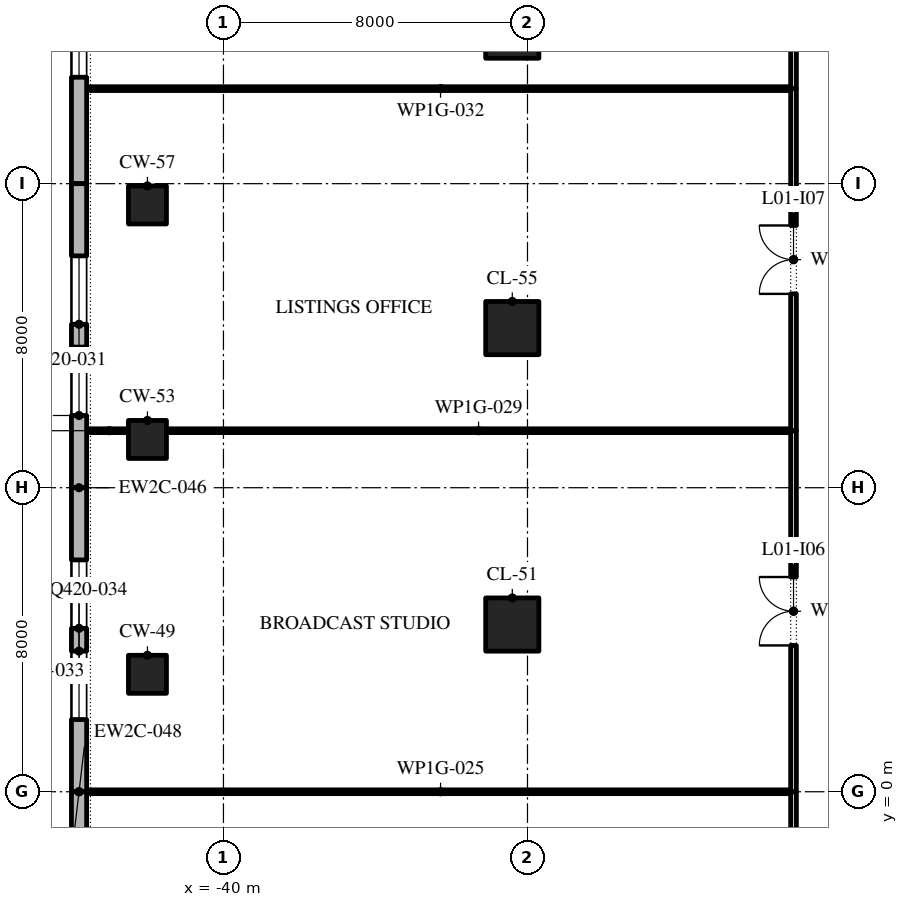
"""IFC4 building model, lengths in metres.
Left out: names, types, materials, properties, quantities, classifications, styles, units other than length and angle.
Written with IfcOpenShell. Run it as: python <this file> out.ifc"""

import sys

from ifc_helpers import new_model, si_unit, direction, frame, frame_2d, origin, origin_2d, place, context, subcontext, project, spatial, polyline, rectangle, outline, extrude, element, fill, save


model = new_model("IFC4")
c1 = context("Model", 3, precision=1e-05, world=origin(), true_north=direction((0.0, 1.0)))
c2 = subcontext(c1, "Body", "Model", "MODEL_VIEW")
j1 = project(units=[si_unit("LENGTHUNIT", "METRE"), si_unit("PLANEANGLEUNIT", "RADIAN")], contexts=[c1])
p1 = place(None, origin())
s1 = spatial("IfcSite", under=j1, at=p1, CompositionType="ELEMENT")
p2 = place(p1, origin())
s2 = spatial("IfcBuilding", under=s1, at=p2, CompositionType="ELEMENT")
p3 = place(p2, frame((0.0, 0.0, 8.0)))
s3 = spatial("IfcBuildingStorey", under=s2, at=p3, CompositionType="ELEMENT", Elevation=8.0)
p4 = place(p3, frame((-42.0, 3.09, 0.0), z_axis=(0.0, 0.0, 1.0), x_axis=(1.0, 0.0, 0.0)))
e1 = element("IfcColumn", 1, at=p4, inside=s3, PredefinedType="COLUMN", context=c2, shape_type="SweptSolid", body=[
    extrude(rectangle(XDim=1.0, YDim=1.0, at=origin_2d()), origin(), (0.0, 0.0, 1.0), 6.0),
])
p5 = place(p3, frame((-32.4, 4.4, 0.0), z_axis=(0.0, 0.0, 1.0), x_axis=(1.0, 0.0, 0.0)))
e2 = element("IfcColumn", 2, at=p5, inside=s3, PredefinedType="COLUMN", context=c2, shape_type="SweptSolid", body=[
    extrude(rectangle(XDim=1.4, YDim=1.4, at=origin_2d()), origin(), (0.0, 0.0, 1.0), 6.0),
])
p6 = place(p3, frame((-42.0, 9.27, 0.0), z_axis=(0.0, 0.0, 1.0), x_axis=(1.0, 0.0, 0.0)))
e3 = element("IfcColumn", 3, at=p6, inside=s3, PredefinedType="COLUMN", context=c2, shape_type="SweptSolid", body=[
    extrude(rectangle(XDim=1.0, YDim=1.0, at=origin_2d()), origin(), (0.0, 0.0, 1.0), 6.0),
])
p7 = place(p3, frame((-32.4, 12.2, 0.0), z_axis=(0.0, 0.0, 1.0), x_axis=(1.0, 0.0, 0.0)))
e4 = element("IfcColumn", 4, at=p7, inside=s3, PredefinedType="COLUMN", context=c2, shape_type="SweptSolid", body=[
    extrude(rectangle(XDim=1.4, YDim=1.4, at=origin_2d()), origin(), (0.0, 0.0, 1.0), 6.0),
])
p8 = place(p3, frame((-42.0, 15.44, 0.0), z_axis=(0.0, 0.0, 1.0), x_axis=(1.0, 0.0, 0.0)))
e5 = element("IfcColumn", 5, at=p8, inside=s3, PredefinedType="COLUMN", context=c2, shape_type="SweptSolid", body=[
    extrude(rectangle(XDim=1.0, YDim=1.0, at=origin_2d()), origin(), (0.0, 0.0, 1.0), 6.0),
])
p9 = place(p3, frame((-32.4, 20.0, 0.0), z_axis=(0.0, 0.0, 1.0), x_axis=(1.0, 0.0, 0.0)))
e6 = element("IfcColumn", 6, at=p9, inside=s3, PredefinedType="COLUMN", context=c2, shape_type="SweptSolid", body=[
    extrude(rectangle(XDim=1.4, YDim=1.4, at=origin_2d()), origin(), (0.0, 0.0, 1.0), 6.0),
])
p10 = place(p3, frame((-43.8, 24.0, 0.0), z_axis=(0.0, 0.0, 1.0), x_axis=(0.0, -1.0, 0.0)))
e7 = element("IfcWall", 7, at=p10, inside=s3, PredefinedType="STANDARD", context=c2, shape_type="SweptSolid", body=[
    extrude(rectangle(XDim=8.0, YDim=0.4, at=frame_2d((4.0, 0.0))), origin(), (0.0, 0.0, 1.0), 5.7),
])
p11 = place(p10, frame((2.8, 0.0, 0.9)))
e8 = element("IfcOpeningElement", 8, at=p11, cuts=e7, PredefinedType="OPENING", context=c2, shape_type="SweptSolid", body=[
    extrude(outline(polyline([(0.0, 0.0), (2.4, 0.0), (2.4, 2.122), (2.379, 2.435), (2.318, 2.743), (2.217, 3.04), (2.078, 3.322), (1.904, 3.583), (1.697, 3.819), (1.461, 4.026), (1.2, 4.2), (0.939, 4.026), (0.703, 3.819), (0.496, 3.583), (0.322, 3.322), (0.183, 3.04), (0.082, 2.743), (0.021, 2.435), (0.0, 2.122), (0.0, 0.0)])), frame((0.0, 0.21, 0.0), z_axis=(0.0, -1.0, 0.0), x_axis=(1.0, 0.0, 0.0)), (0.0, 0.0, 1.0), 0.42),
])
p12 = place(p3, frame((-43.8, 16.0, 0.0), z_axis=(0.0, 0.0, 1.0), x_axis=(0.0, -1.0, 0.0)))
e9 = element("IfcWall", 9, at=p12, inside=s3, PredefinedType="STANDARD", context=c2, shape_type="SweptSolid", body=[
    extrude(rectangle(XDim=8.0, YDim=0.4, at=frame_2d((4.0, 0.0))), origin(), (0.0, 0.0, 1.0), 5.7),
])
p13 = place(p12, frame((1.9, 0.0, 0.9)))
e10 = element("IfcOpeningElement", 10, at=p13, cuts=e9, PredefinedType="OPENING", context=c2, shape_type="SweptSolid", body=[
    extrude(outline(polyline([(0.0, 0.0), (1.8, 0.0), (1.8, 2.641), (1.785, 2.876), (1.739, 3.107), (1.663, 3.33), (1.559, 3.541), (1.428, 3.737), (1.273, 3.914), (1.096, 4.069), (0.9, 4.2), (0.704, 4.069), (0.527, 3.914), (0.372, 3.737), (0.241, 3.541), (0.137, 3.33), (0.061, 3.107), (0.015, 2.876), (0.0, 2.641), (0.0, 0.0)])), frame((0.0, 0.21, 0.0), z_axis=(0.0, -1.0, 0.0), x_axis=(1.0, 0.0, 0.0)), (0.0, 0.0, 1.0), 0.42),
])
p14 = place(p12, frame((4.3, 0.0, 0.9)))
e11 = element("IfcOpeningElement", 11, at=p14, cuts=e9, PredefinedType="OPENING", context=c2, shape_type="SweptSolid", body=[
    extrude(outline(polyline([(0.0, 0.0), (1.8, 0.0), (1.8, 2.641), (1.785, 2.876), (1.739, 3.107), (1.663, 3.33), (1.559, 3.541), (1.428, 3.737), (1.273, 3.914), (1.096, 4.069), (0.9, 4.2), (0.704, 4.069), (0.527, 3.914), (0.372, 3.737), (0.241, 3.541), (0.137, 3.33), (0.061, 3.107), (0.015, 2.876), (0.0, 2.641), (0.0, 0.0)])), frame((0.0, 0.21, 0.0), z_axis=(0.0, -1.0, 0.0), x_axis=(1.0, 0.0, 0.0)), (0.0, 0.0, 1.0), 0.42),
])
p15 = place(p3, frame((-43.8, 8.0, 0.0), z_axis=(0.0, 0.0, 1.0), x_axis=(0.0, -1.0, 0.0)))
e12 = element("IfcWall", 12, at=p15, inside=s3, PredefinedType="STANDARD", context=c2, shape_type="SweptSolid", body=[
    extrude(rectangle(XDim=8.0, YDim=0.4, at=frame_2d((4.0, 0.0))), origin(), (0.0, 0.0, 1.0), 5.7),
])
p16 = place(p15, frame((1.9, 0.0, 0.9)))
e13 = element("IfcOpeningElement", 13, at=p16, cuts=e12, PredefinedType="OPENING", context=c2, shape_type="SweptSolid", body=[
    extrude(outline(polyline([(0.0, 0.0), (1.8, 0.0), (1.8, 2.641), (1.785, 2.876), (1.739, 3.107), (1.663, 3.33), (1.559, 3.541), (1.428, 3.737), (1.273, 3.914), (1.096, 4.069), (0.9, 4.2), (0.704, 4.069), (0.527, 3.914), (0.372, 3.737), (0.241, 3.541), (0.137, 3.33), (0.061, 3.107), (0.015, 2.876), (0.0, 2.641), (0.0, 0.0)])), frame((0.0, 0.21, 0.0), z_axis=(0.0, -1.0, 0.0), x_axis=(1.0, 0.0, 0.0)), (0.0, 0.0, 1.0), 0.42),
])
p17 = place(p15, frame((4.3, 0.0, 0.9)))
e14 = element("IfcOpeningElement", 14, at=p17, cuts=e12, PredefinedType="OPENING", context=c2, shape_type="SweptSolid", body=[
    extrude(outline(polyline([(0.0, 0.0), (1.8, 0.0), (1.8, 2.641), (1.785, 2.876), (1.739, 3.107), (1.663, 3.33), (1.559, 3.541), (1.428, 3.737), (1.273, 3.914), (1.096, 4.069), (0.9, 4.2), (0.704, 4.069), (0.527, 3.914), (0.372, 3.737), (0.241, 3.541), (0.137, 3.33), (0.061, 3.107), (0.015, 2.876), (0.0, 2.641), (0.0, 0.0)])), frame((0.0, 0.21, 0.0), z_axis=(0.0, -1.0, 0.0), x_axis=(1.0, 0.0, 0.0)), (0.0, 0.0, 1.0), 0.42),
])
p18 = place(p3, frame((-43.8, 0.0, 0.0), z_axis=(0.0, 0.0, 1.0), x_axis=(0.0, -1.0, 0.0)))
e15 = element("IfcWall", 15, at=p18, inside=s3, PredefinedType="STANDARD", context=c2, shape_type="SweptSolid", body=[
    extrude(rectangle(XDim=8.0, YDim=0.4, at=frame_2d((4.0, 0.0))), origin(), (0.0, 0.0, 1.0), 5.7),
])
p19 = place(p18, frame((1.9, 0.0, 0.9)))
e16 = element("IfcOpeningElement", 16, at=p19, cuts=e15, PredefinedType="OPENING", context=c2, shape_type="SweptSolid", body=[
    extrude(outline(polyline([(0.0, 0.0), (1.8, 0.0), (1.8, 2.641), (1.785, 2.876), (1.739, 3.107), (1.663, 3.33), (1.559, 3.541), (1.428, 3.737), (1.273, 3.914), (1.096, 4.069), (0.9, 4.2), (0.704, 4.069), (0.527, 3.914), (0.372, 3.737), (0.241, 3.541), (0.137, 3.33), (0.061, 3.107), (0.015, 2.876), (0.0, 2.641), (0.0, 0.0)])), frame((0.0, 0.21, 0.0), z_axis=(0.0, -1.0, 0.0), x_axis=(1.0, 0.0, 0.0)), (0.0, 0.0, 1.0), 0.42),
])
p20 = place(p18, frame((4.3, 0.0, 0.9)))
e17 = element("IfcOpeningElement", 17, at=p20, cuts=e15, PredefinedType="OPENING", context=c2, shape_type="SweptSolid", body=[
    extrude(outline(polyline([(0.0, 0.0), (1.8, 0.0), (1.8, 2.641), (1.785, 2.876), (1.739, 3.107), (1.663, 3.33), (1.559, 3.541), (1.428, 3.737), (1.273, 3.914), (1.096, 4.069), (0.9, 4.2), (0.704, 4.069), (0.527, 3.914), (0.372, 3.737), (0.241, 3.541), (0.137, 3.33), (0.061, 3.107), (0.015, 2.876), (0.0, 2.641), (0.0, 0.0)])), frame((0.0, 0.21, 0.0), z_axis=(0.0, -1.0, 0.0), x_axis=(1.0, 0.0, 0.0)), (0.0, 0.0, 1.0), 0.42),
])
p21 = place(p3, frame((-43.5, 0.0, 0.0), z_axis=(0.0, 0.0, 1.0), x_axis=(1.0, 0.0, 0.0)))
e18 = element("IfcWall", 18, at=p21, inside=s3, PredefinedType="PARTITIONING", context=c2, shape_type="SweptSolid", body=[
    extrude(rectangle(XDim=18.425, YDim=0.1, at=frame_2d((9.212, 0.0))), origin(), (0.0, 0.0, 1.0), 5.7),
])
p22 = place(p3, frame((-43.5, 9.5, 0.0), z_axis=(0.0, 0.0, 1.0), x_axis=(1.0, 0.0, 0.0)))
e19 = element("IfcWall", 19, at=p22, inside=s3, PredefinedType="PARTITIONING", context=c2, shape_type="SweptSolid", body=[
    extrude(rectangle(XDim=1.0, YDim=0.1, at=frame_2d((0.5, 0.0))), origin(), (0.0, 0.0, 1.0), 5.7),
])
p23 = place(p3, frame((-41.5, 9.5, 0.0), z_axis=(0.0, 0.0, 1.0), x_axis=(1.0, 0.0, 0.0)))
e20 = element("IfcWall", 20, at=p23, inside=s3, PredefinedType="PARTITIONING", context=c2, shape_type="SweptSolid", body=[
    extrude(rectangle(XDim=16.425, YDim=0.1, at=frame_2d((8.212, 0.0))), origin(), (0.0, 0.0, 1.0), 5.7),
])
p24 = place(p3, frame((-43.5, 18.5, 0.0), z_axis=(0.0, 0.0, 1.0), x_axis=(1.0, 0.0, 0.0)))
e21 = element("IfcWall", 21, at=p24, inside=s3, PredefinedType="PARTITIONING", context=c2, shape_type="SweptSolid", body=[
    extrude(rectangle(XDim=18.425, YDim=0.1, at=frame_2d((9.212, 0.0))), origin(), (0.0, 0.0, 1.0), 5.7),
])
p25 = place(p3, frame((-25.0, -9.5, 0.0), z_axis=(0.0, 0.0, 1.0), x_axis=(0.0, 1.0, 0.0)))
e22 = element("IfcWall", 22, at=p25, inside=s3, PredefinedType="PARTITIONING", context=c2, shape_type="SweptSolid", body=[
    extrude(rectangle(XDim=9.5, YDim=0.15, at=frame_2d((4.75, 0.0))), origin(), (0.0, 0.0, 1.0), 5.7),
])
p26 = place(p25, frame((3.85, 0.0, 0.0)))
e23 = element("IfcOpeningElement", 23, at=p26, cuts=e22, PredefinedType="OPENING", context=c2, shape_type="SweptSolid", body=[
    extrude(rectangle(XDim=1.8, YDim=2.1, at=frame_2d((0.9, 1.05))), frame((0.0, 0.085, 0.0), z_axis=(0.0, -1.0, 0.0), x_axis=(1.0, 0.0, 0.0)), (0.0, 0.0, 1.0), 0.17),
])
p27 = place(p3, frame((-25.0, 0.0, 0.0), z_axis=(0.0, 0.0, 1.0), x_axis=(0.0, 1.0, 0.0)))
e24 = element("IfcWall", 24, at=p27, inside=s3, PredefinedType="PARTITIONING", context=c2, shape_type="SweptSolid", body=[
    extrude(rectangle(XDim=9.5, YDim=0.15, at=frame_2d((4.75, 0.0))), origin(), (0.0, 0.0, 1.0), 5.7),
])
p28 = place(p27, frame((3.85, 0.0, 0.0)))
e25 = element("IfcOpeningElement", 25, at=p28, cuts=e24, PredefinedType="OPENING", context=c2, shape_type="SweptSolid", body=[
    extrude(rectangle(XDim=1.8, YDim=2.1, at=frame_2d((0.9, 1.05))), frame((0.0, 0.085, 0.0), z_axis=(0.0, -1.0, 0.0), x_axis=(1.0, 0.0, 0.0)), (0.0, 0.0, 1.0), 0.17),
])
p29 = place(p3, frame((-25.0, 9.5, 0.0), z_axis=(0.0, 0.0, 1.0), x_axis=(0.0, 1.0, 0.0)))
e26 = element("IfcWall", 26, at=p29, inside=s3, PredefinedType="PARTITIONING", context=c2, shape_type="SweptSolid", body=[
    extrude(rectangle(XDim=9.0, YDim=0.15, at=frame_2d((4.5, 0.0))), origin(), (0.0, 0.0, 1.0), 5.7),
])
p30 = place(p29, frame((3.6, 0.0, 0.0)))
e27 = element("IfcOpeningElement", 27, at=p30, cuts=e26, PredefinedType="OPENING", context=c2, shape_type="SweptSolid", body=[
    extrude(rectangle(XDim=1.8, YDim=2.1, at=frame_2d((0.9, 1.05))), frame((0.0, 0.085, 0.0), z_axis=(0.0, -1.0, 0.0), x_axis=(1.0, 0.0, 0.0)), (0.0, 0.0, 1.0), 0.17),
])
p31 = place(p3, frame((-25.0, 18.5, 0.0), z_axis=(0.0, 0.0, 1.0), x_axis=(0.0, 1.0, 0.0)))
e28 = element("IfcWall", 28, at=p31, inside=s3, PredefinedType="PARTITIONING", context=c2, shape_type="SweptSolid", body=[
    extrude(rectangle(XDim=7.5, YDim=0.15, at=frame_2d((3.75, 0.0))), origin(), (0.0, 0.0, 1.0), 5.7),
])
p32 = place(p31, frame((3.25, 0.0, 0.0)))
e29 = element("IfcOpeningElement", 29, at=p32, cuts=e28, PredefinedType="OPENING", context=c2, shape_type="SweptSolid", body=[
    extrude(rectangle(XDim=1.0, YDim=2.1, at=frame_2d((0.5, 1.05))), frame((0.0, 0.085, 0.0), z_axis=(0.0, -1.0, 0.0), x_axis=(1.0, 0.0, 0.0)), (0.0, 0.0, 1.0), 0.17),
])
p33 = place(p11, origin())
e30 = element("IfcWindow", 30, at=p33, inside=s3, PartitioningType="DOUBLE_PANEL_VERTICAL", PredefinedType="WINDOW", context=c2, shape_type="SweptSolid", body=[
    extrude(outline(polyline([(0.0, 0.0), (2.4, 0.0), (2.4, 2.122), (2.379, 2.435), (2.318, 2.743), (2.217, 3.04), (2.078, 3.322), (1.904, 3.583), (1.697, 3.819), (1.461, 4.026), (1.2, 4.2), (0.939, 4.026), (0.703, 3.819), (0.496, 3.583), (0.322, 3.322), (0.183, 3.04), (0.082, 2.743), (0.021, 2.435), (0.0, 2.122), (0.0, 0.0)])), frame((0.0, 0.03, 0.0), z_axis=(0.0, -1.0, 0.0), x_axis=(1.0, 0.0, 0.0)), (0.0, 0.0, 1.0), 0.06),
])
fill(e8, e30)
p34 = place(p13, origin())
e31 = element("IfcWindow", 31, at=p34, inside=s3, PartitioningType="DOUBLE_PANEL_VERTICAL", PredefinedType="WINDOW", context=c2, shape_type="SweptSolid", body=[
    extrude(outline(polyline([(0.0, 0.0), (1.8, 0.0), (1.8, 2.641), (1.785, 2.876), (1.739, 3.107), (1.663, 3.33), (1.559, 3.541), (1.428, 3.737), (1.273, 3.914), (1.096, 4.069), (0.9, 4.2), (0.704, 4.069), (0.527, 3.914), (0.372, 3.737), (0.241, 3.541), (0.137, 3.33), (0.061, 3.107), (0.015, 2.876), (0.0, 2.641), (0.0, 0.0)])), frame((0.0, 0.03, 0.0), z_axis=(0.0, -1.0, 0.0), x_axis=(1.0, 0.0, 0.0)), (0.0, 0.0, 1.0), 0.06),
])
fill(e10, e31)
p35 = place(p14, origin())
e32 = element("IfcWindow", 32, at=p35, inside=s3, PartitioningType="DOUBLE_PANEL_VERTICAL", PredefinedType="WINDOW", context=c2, shape_type="SweptSolid", body=[
    extrude(outline(polyline([(0.0, 0.0), (1.8, 0.0), (1.8, 2.641), (1.785, 2.876), (1.739, 3.107), (1.663, 3.33), (1.559, 3.541), (1.428, 3.737), (1.273, 3.914), (1.096, 4.069), (0.9, 4.2), (0.704, 4.069), (0.527, 3.914), (0.372, 3.737), (0.241, 3.541), (0.137, 3.33), (0.061, 3.107), (0.015, 2.876), (0.0, 2.641), (0.0, 0.0)])), frame((0.0, 0.03, 0.0), z_axis=(0.0, -1.0, 0.0), x_axis=(1.0, 0.0, 0.0)), (0.0, 0.0, 1.0), 0.06),
])
fill(e11, e32)
p36 = place(p16, origin())
e33 = element("IfcWindow", 33, at=p36, inside=s3, PartitioningType="DOUBLE_PANEL_VERTICAL", PredefinedType="WINDOW", context=c2, shape_type="SweptSolid", body=[
    extrude(outline(polyline([(0.0, 0.0), (1.8, 0.0), (1.8, 2.641), (1.785, 2.876), (1.739, 3.107), (1.663, 3.33), (1.559, 3.541), (1.428, 3.737), (1.273, 3.914), (1.096, 4.069), (0.9, 4.2), (0.704, 4.069), (0.527, 3.914), (0.372, 3.737), (0.241, 3.541), (0.137, 3.33), (0.061, 3.107), (0.015, 2.876), (0.0, 2.641), (0.0, 0.0)])), frame((0.0, 0.03, 0.0), z_axis=(0.0, -1.0, 0.0), x_axis=(1.0, 0.0, 0.0)), (0.0, 0.0, 1.0), 0.06),
])
fill(e13, e33)
p37 = place(p17, origin())
e34 = element("IfcWindow", 34, at=p37, inside=s3, PartitioningType="DOUBLE_PANEL_VERTICAL", PredefinedType="WINDOW", context=c2, shape_type="SweptSolid", body=[
    extrude(outline(polyline([(0.0, 0.0), (1.8, 0.0), (1.8, 2.641), (1.785, 2.876), (1.739, 3.107), (1.663, 3.33), (1.559, 3.541), (1.428, 3.737), (1.273, 3.914), (1.096, 4.069), (0.9, 4.2), (0.704, 4.069), (0.527, 3.914), (0.372, 3.737), (0.241, 3.541), (0.137, 3.33), (0.061, 3.107), (0.015, 2.876), (0.0, 2.641), (0.0, 0.0)])), frame((0.0, 0.03, 0.0), z_axis=(0.0, -1.0, 0.0), x_axis=(1.0, 0.0, 0.0)), (0.0, 0.0, 1.0), 0.06),
])
fill(e14, e34)
p38 = place(p28, origin())
e35 = element("IfcDoor", 35, at=p38, inside=s3, OperationType="SINGLE_SWING_RIGHT", PredefinedType="DOOR", context=c2, shape_type="SweptSolid", body=[
    extrude(rectangle(XDim=1.8, YDim=2.1, at=frame_2d((0.9, 1.05))), frame((0.0, 0.025, 0.0), z_axis=(0.0, -1.0, 0.0), x_axis=(1.0, 0.0, 0.0)), (0.0, 0.0, 1.0), 0.05),
])
fill(e25, e35)
p39 = place(p30, origin())
e36 = element("IfcDoor", 36, at=p39, inside=s3, OperationType="SINGLE_SWING_RIGHT", PredefinedType="DOOR", context=c2, shape_type="SweptSolid", body=[
    extrude(rectangle(XDim=1.8, YDim=2.1, at=frame_2d((0.9, 1.05))), frame((0.0, 0.025, 0.0), z_axis=(0.0, -1.0, 0.0), x_axis=(1.0, 0.0, 0.0)), (0.0, 0.0, 1.0), 0.05),
])
fill(e27, e36)
save(model, sys.argv[1])
